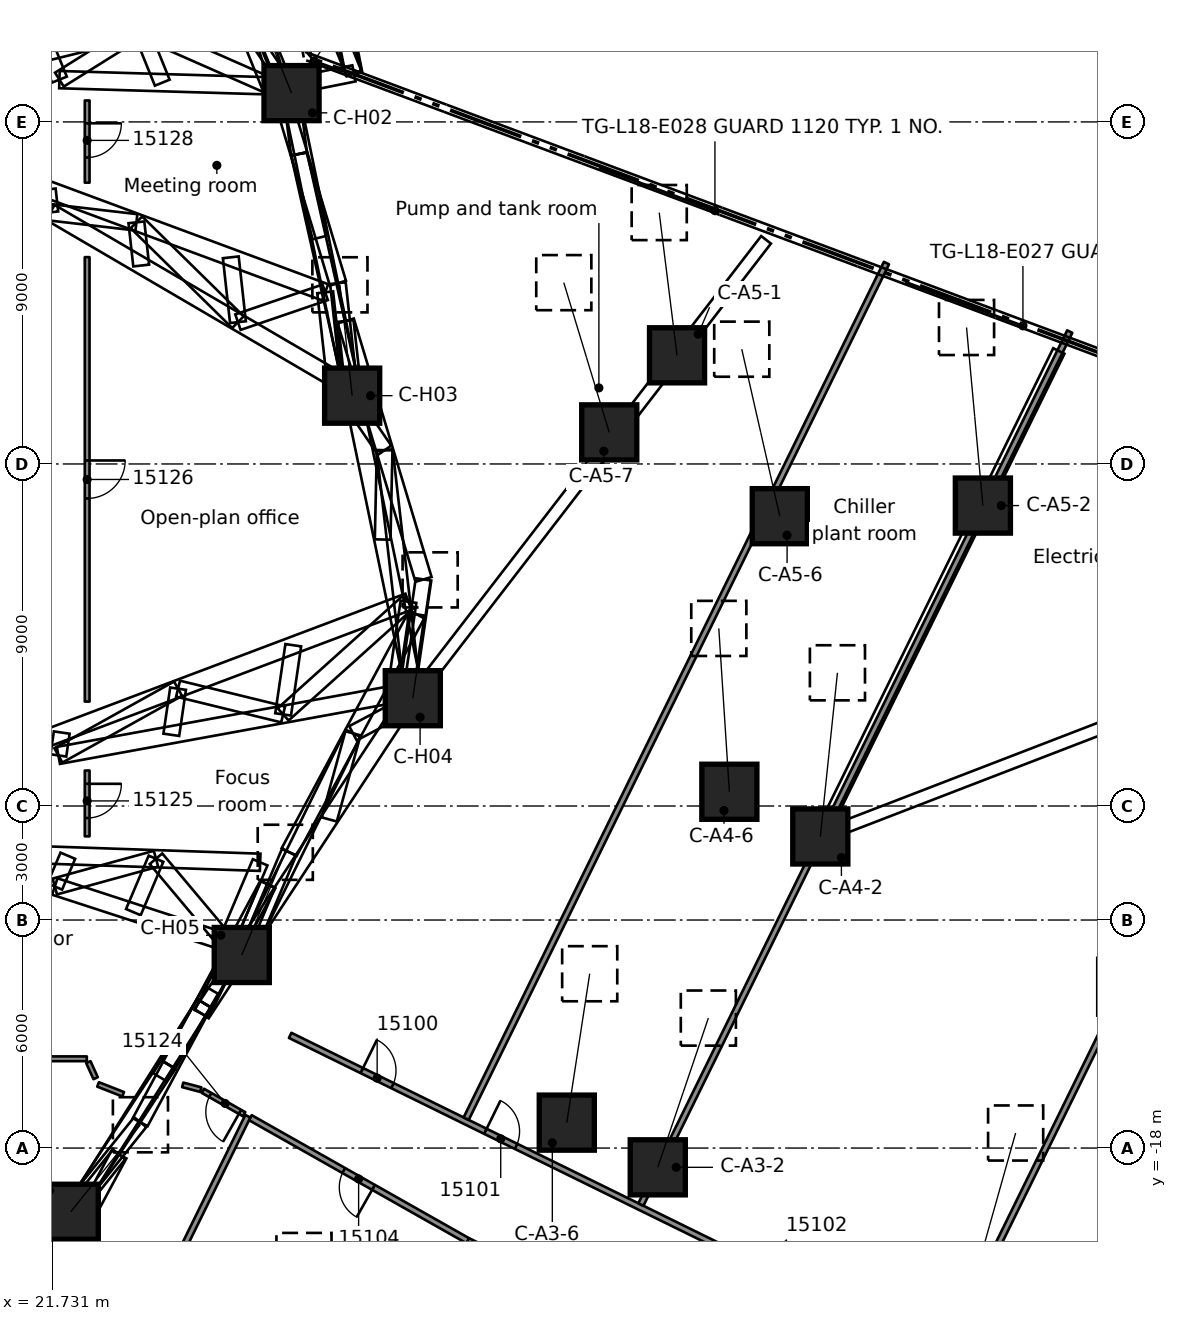
"""IFC4 building model, lengths in metres.
Left out: names, types, materials, properties, quantities, classifications, styles, units other than length and angle.
Written with IfcOpenShell. Run it as: python <this file> out.ifc"""

import sys

from ifc_helpers import new_model, si_unit, direction, frame, frame_2d, origin, origin_2d, place, context, subcontext, project, spatial, rectangle, extrude, element, fill, save


model = new_model("IFC4")
c1 = context("Model", 3, precision=1e-05, world=origin(), true_north=direction((0.0, 1.0)))
c2 = subcontext(c1, "Body", "Model", "MODEL_VIEW")
j1 = project(units=[si_unit("LENGTHUNIT", "METRE"), si_unit("PLANEANGLEUNIT", "RADIAN")], contexts=[c1])
p1 = place(None, origin())
s1 = spatial("IfcSite", under=j1, at=p1, CompositionType="ELEMENT")
p2 = place(p1, origin())
s2 = spatial("IfcBuilding", under=s1, at=p2, CompositionType="ELEMENT")
p3 = place(p2, frame((0.0, 0.0, 76.3)))
s3 = spatial("IfcBuildingStorey", under=s2, at=p3, CompositionType="ELEMENT", Elevation=76.3)
p4 = place(p3, frame((27.046, -24.096, 0.515), z_axis=(0.273638788717, 0.655437821725, 0.703933999152), x_axis=(-0.922806926199, 0.38526273757, 0.0)))
e1 = element("IfcColumn", 1, at=p4, inside=s3, PredefinedType="COLUMN", context=c2, shape_type="SweptSolid", body=[
    extrude(rectangle(XDim=1.45, YDim=1.45, at=origin_2d()), origin(), (0.0, 0.0, 1.0), 4.788),
])
p5 = place(p3, frame((37.666, -18.507, 0.57), z_axis=(0.252347690402, 0.744499743234, 0.618094471318), x_axis=(-0.947075588551, 0.321010637785, 0.0)))
e2 = element("IfcColumn", 2, at=p5, inside=s3, PredefinedType="COLUMN", context=c2, shape_type="SweptSolid", body=[
    extrude(rectangle(XDim=1.45, YDim=1.45, at=origin_2d()), origin(), (0.0, 0.0, 1.0), 5.275),
])
p6 = place(p3, frame((45.713, -22.461, 0.614), z_axis=(0.229855301875, 0.814814927922, 0.532205950207), x_axis=(-0.962438656011, 0.27149923281, 0.0)))
e3 = element("IfcColumn", 3, at=p6, inside=s3, PredefinedType="COLUMN", context=c2, shape_type="SweptSolid", body=[
    extrude(rectangle(XDim=1.45, YDim=1.45, at=origin_2d()), origin(), (0.0, 0.0, 1.0), 5.961),
])
p7 = place(p3, frame((35.272, -17.331, 0.558), z_axis=(0.117156658899, 0.761186259922, 0.637863461081), x_axis=(-0.988361727552, 0.152121975764, 0.0)))
e4 = element("IfcColumn", 4, at=p7, inside=s3, PredefinedType="COLUMN", context=c2, shape_type="SweptSolid", body=[
    extrude(rectangle(XDim=1.45, YDim=1.45, at=origin_2d()), origin(), (0.0, 0.0, 1.0), 5.147),
])
p8 = place(p3, frame((41.943, -9.801, 0.581), z_axis=(0.083399652731, 0.79638314847, 0.599014506299), x_axis=(-0.994561238126, 0.10415346186, 0.0)))
e5 = element("IfcColumn", 5, at=p8, inside=s3, PredefinedType="COLUMN", context=c2, shape_type="SweptSolid", body=[
    extrude(rectangle(XDim=1.45, YDim=1.45, at=origin_2d()), origin(), (0.0, 0.0, 1.0), 5.407),
])
p9 = place(p3, frame((39.55, -8.625, 0.579), z_axis=(-0.051587307713, 0.797361327735, 0.601293325022), x_axis=(-0.997913662281, -0.064562548216, 0.0)))
e6 = element("IfcColumn", 6, at=p9, inside=s3, PredefinedType="COLUMN", context=c2, shape_type="SweptSolid", body=[
    extrude(rectangle(XDim=1.45, YDim=1.45, at=origin_2d()), origin(), (0.0, 0.0, 1.0), 5.39),
])
p10 = place(p3, frame((38.173, 2.859, 0.546), z_axis=(-0.093293000963, 0.747169609484, 0.658053182224), x_axis=(-0.992294736126, -0.123899784732, 0.0)))
e7 = element("IfcColumn", 7, at=p10, inside=s3, PredefinedType="COLUMN", context=c2, shape_type="SweptSolid", body=[
    extrude(rectangle(XDim=1.45, YDim=1.45, at=origin_2d()), origin(), (0.0, 0.0, 1.0), 5.027),
])
p11 = place(p3, frame((46.221, -1.095, 0.599), z_axis=(-0.075541470187, 0.823363417812, 0.562464370863), x_axis=(-0.995817591269, -0.091363695854, 0.0)))
e8 = element("IfcColumn", 8, at=p11, inside=s3, PredefinedType="COLUMN", context=c2, shape_type="SweptSolid", body=[
    extrude(rectangle(XDim=1.45, YDim=1.45, at=origin_2d()), origin(), (0.0, 0.0, 1.0), 5.691),
])
p12 = place(p3, frame((40.877, -1.374, 0.59), z_axis=(-0.180717754786, 0.793306866009, 0.581382240396), x_axis=(-0.975020978292, -0.222112790921, 0.0)))
e9 = element("IfcColumn", 9, at=p12, inside=s3, PredefinedType="COLUMN", context=c2, shape_type="SweptSolid", body=[
    extrude(rectangle(XDim=1.45, YDim=1.45, at=origin_2d()), origin(), (0.0, 0.0, 1.0), 5.539),
])
p13 = place(p3, frame((36.389, 0.831, 0.568), z_axis=(-0.227597691455, 0.749892107941, 0.621177202811), x_axis=(-0.956897644935, -0.290425372716, 0.0)))
e10 = element("IfcColumn", 10, at=p13, inside=s3, PredefinedType="COLUMN", context=c2, shape_type="SweptSolid", body=[
    extrude(rectangle(XDim=1.45, YDim=1.45, at=origin_2d()), origin(), (0.0, 0.0, 1.0), 5.254),
])
p14 = place(p3, frame((28.029, 9.758, 0.469), z_axis=(-0.242399975133, 0.599329365947, 0.762919761947), x_axis=(-0.927046689542, -0.374945909979, 0.0)))
e11 = element("IfcColumn", 11, at=p14, inside=s3, PredefinedType="COLUMN", context=c2, shape_type="SweptSolid", body=[
    extrude(rectangle(XDim=1.45, YDim=1.45, at=origin_2d()), origin(), (0.0, 0.0, 1.0), 4.538),
])
p15 = place(p3, frame((29.624, 1.797, 0.469), z_axis=(-0.070948481985, 0.642678137038, 0.762844102735), x_axis=(-0.993961604032, -0.1097284362, 0.0)))
e12 = element("IfcColumn", 12, at=p15, inside=s3, PredefinedType="COLUMN", context=c2, shape_type="SweptSolid", body=[
    extrude(rectangle(XDim=1.45, YDim=1.45, at=origin_2d()), origin(), (0.0, 0.0, 1.0), 4.539),
])
p16 = place(p3, frame((31.22, -6.163, 0.491), z_axis=(0.098169402539, 0.670106023434, 0.735744986909), x_axis=(-0.989438817347, 0.144951118407, 0.0)))
e13 = element("IfcColumn", 13, at=p16, inside=s3, PredefinedType="COLUMN", context=c2, shape_type="SweptSolid", body=[
    extrude(rectangle(XDim=1.45, YDim=1.45, at=origin_2d()), origin(), (0.0, 0.0, 1.0), 4.646),
])
p17 = place(p3, frame((26.719, -12.92, 0.469), z_axis=(0.252280476656, 0.595306617304, 0.762866038366), x_axis=(-0.920733990351, 0.390190875101, 0.0)))
e14 = element("IfcColumn", 14, at=p17, inside=s3, PredefinedType="COLUMN", context=c2, shape_type="SweptSolid", body=[
    extrude(rectangle(XDim=1.45, YDim=1.45, at=origin_2d()), origin(), (0.0, 0.0, 1.0), 4.539),
])
p18 = place(p3, frame((22.219, -19.677, 0.469), z_axis=(0.404114198636, 0.504604790097, 0.762932316967), x_axis=(-0.780543967772, 0.625100883358, 0.0)))
e15 = element("IfcColumn", 15, at=p18, inside=s3, PredefinedType="COLUMN", context=c2, shape_type="SweptSolid", body=[
    extrude(rectangle(XDim=1.45, YDim=1.45, at=origin_2d()), origin(), (0.0, 0.0, 1.0), 4.538),
])
p19 = place(p3, frame((22.682, -15.739, 0.0), z_axis=(0.0, 0.0, 1.0), x_axis=(0.413486242538, -0.910510366351, 0.0)))
e16 = element("IfcWall", 16, at=p19, inside=s3, PredefinedType="PARTITIONING", context=c2, shape_type="SweptSolid", body=[
    extrude(rectangle(XDim=0.465, YDim=0.125, at=frame_2d((0.232, 0.0))), origin(), (0.0, 0.0, 1.0), 3.98),
])
p20 = place(p3, frame((26.782, -17.11, 0.0), z_axis=(0.0, 0.0, 1.0), x_axis=(-0.869921591707, 0.493190048847, 0.0)))
e17 = element("IfcWall", 17, at=p20, inside=s3, PredefinedType="PARTITIONING", context=c2, shape_type="SweptSolid", body=[
    extrude(rectangle(XDim=1.25, YDim=0.125, at=frame_2d((0.625, 0.0))), origin(), (0.0, 0.0, 1.0), 3.98),
])
p21 = place(p20, frame((0.125, 0.0, 0.0)))
e18 = element("IfcOpeningElement", 18, at=p21, cuts=e17, PredefinedType="OPENING", context=c2, shape_type="SweptSolid", body=[
    extrude(rectangle(XDim=0.9, YDim=2.1, at=frame_2d((0.45, 1.05))), frame((0.0, 0.073, 0.0), z_axis=(0.0, -1.0, 0.0), x_axis=(1.0, 0.0, 0.0)), (0.0, 0.0, 1.0), 0.145),
])
p22 = place(p3, frame((32.666, -20.438, 0.0), z_axis=(0.0, 0.0, 1.0), x_axis=(-0.870308211119, 0.4925074798, 0.0)))
e19 = element("IfcWall", 19, at=p22, inside=s3, PredefinedType="PARTITIONING", context=c2, shape_type="SweptSolid", body=[
    extrude(rectangle(XDim=6.575, YDim=0.15, at=frame_2d((3.287, 0.0))), origin(), (0.0, 0.0, 1.0), 3.98),
])
p23 = place(p22, frame((2.85, 0.0, 0.0)))
e20 = element("IfcOpeningElement", 20, at=p23, cuts=e19, PredefinedType="OPENING", context=c2, shape_type="SweptSolid", body=[
    extrude(rectangle(XDim=0.9, YDim=2.1, at=frame_2d((0.45, 1.05))), frame((0.0, 0.085, 0.0), z_axis=(0.0, -1.0, 0.0), x_axis=(1.0, 0.0, 0.0)), (0.0, 0.0, 1.0), 0.17),
])
p24 = place(p3, frame((43.321, -25.673, 0.0), z_axis=(0.0, 0.0, 1.0), x_axis=(-0.897519057595, 0.440975669684, 0.0)))
e21 = element("IfcWall", 21, at=p24, inside=s3, PredefinedType="PARTITIONING", context=c2, shape_type="SweptSolid", body=[
    extrude(rectangle(XDim=11.872, YDim=0.15, at=frame_2d((5.936, 0.0))), origin(), (0.0, 0.0, 1.0), 3.98),
])
p25 = place(p24, frame((3.525, 0.0, 0.0)))
e22 = element("IfcOpeningElement", 22, at=p25, cuts=e21, PredefinedType="OPENING", context=c2, shape_type="SweptSolid", body=[
    extrude(rectangle(XDim=0.9, YDim=2.1, at=frame_2d((0.45, 1.05))), frame((0.0, 0.085, 0.0), z_axis=(0.0, -1.0, 0.0), x_axis=(1.0, 0.0, 0.0)), (0.0, 0.0, 1.0), 0.17),
])
p26 = place(p3, frame((27.993, -15.035, 0.0), z_axis=(0.0, 0.0, 1.0), x_axis=(0.897531550108, -0.440950242728, 0.0)))
e23 = element("IfcWall", 23, at=p26, inside=s3, PredefinedType="PARTITIONING", context=c2, shape_type="SweptSolid", body=[
    extrude(rectangle(XDim=18.68, YDim=0.15, at=frame_2d((9.34, 0.0))), origin(), (0.0, 0.0, 1.0), 3.98),
])
p27 = place(p26, frame((2.1, 0.0, 0.0)))
e24 = element("IfcOpeningElement", 24, at=p27, cuts=e23, PredefinedType="OPENING", context=c2, shape_type="SweptSolid", body=[
    extrude(rectangle(XDim=0.9, YDim=2.1, at=frame_2d((0.45, 1.05))), frame((0.0, 0.085, 0.0), z_axis=(0.0, -1.0, 0.0), x_axis=(1.0, 0.0, 0.0)), (0.0, 0.0, 1.0), 0.17),
])
p28 = place(p26, frame((5.723, 0.0, 0.0)))
e25 = element("IfcOpeningElement", 25, at=p28, cuts=e23, PredefinedType="OPENING", context=c2, shape_type="SweptSolid", body=[
    extrude(rectangle(XDim=0.9, YDim=2.1, at=frame_2d((0.45, 1.05))), frame((0.0, 0.085, 0.0), z_axis=(0.0, -1.0, 0.0), x_axis=(1.0, 0.0, 0.0)), (0.0, 0.0, 1.0), 0.17),
])
p29 = place(p26, frame((14.096, 0.0, 0.0)))
e26 = element("IfcOpeningElement", 26, at=p29, cuts=e23, PredefinedType="OPENING", context=c2, shape_type="SweptSolid", body=[
    extrude(rectangle(XDim=0.9, YDim=2.1, at=frame_2d((0.45, 1.05))), frame((0.0, 0.085, 0.0), z_axis=(0.0, -1.0, 0.0), x_axis=(1.0, 0.0, 0.0)), (0.0, 0.0, 1.0), 0.17),
])
p30 = place(p3, frame((22.938, -16.326, 0.0), z_axis=(0.0, 0.0, 1.0), x_axis=(0.931085434085, -0.36480119851, 0.0)))
e27 = element("IfcWall", 27, at=p30, inside=s3, PredefinedType="PARTITIONING", context=c2, shape_type="SweptSolid", body=[
    extrude(rectangle(XDim=0.71, YDim=0.125, at=frame_2d((0.355, 0.0))), origin(), (0.0, 0.0, 1.0), 3.98),
])
p31 = place(p3, frame((25.165, -16.337, 0.0), z_axis=(0.0, 0.0, 1.0), x_axis=(0.966726866197, -0.255810801517, 0.0)))
e28 = element("IfcWall", 28, at=p31, inside=s3, PredefinedType="PARTITIONING", context=c2, shape_type="SweptSolid", body=[
    extrude(rectangle(XDim=0.492, YDim=0.125, at=frame_2d((0.246, 0.0))), origin(), (0.0, 0.0, 1.0), 3.98),
])
p32 = place(p3, frame((22.642, -15.651, 0.0), z_axis=(0.0, 0.0, 1.0), x_axis=(-1.0, 0.0, 0.0)))
e29 = element("IfcWall", 29, at=p32, inside=s3, PredefinedType="PARTITIONING", context=c2, shape_type="SweptSolid", body=[
    extrude(rectangle(XDim=10.482, YDim=0.125, at=frame_2d((5.241, 0.0))), origin(), (0.0, 0.0, 1.0), 3.98),
])
p33 = place(p32, frame((4.35, 0.0, 0.0)))
e30 = element("IfcOpeningElement", 30, at=p33, cuts=e29, PredefinedType="OPENING", context=c2, shape_type="SweptSolid", body=[
    extrude(rectangle(XDim=1.8, YDim=2.1, at=frame_2d((0.9, 1.05))), frame((0.0, 0.073, 0.0), z_axis=(0.0, -1.0, 0.0), x_axis=(1.0, 0.0, 0.0)), (0.0, 0.0, 1.0), 0.145),
])
p34 = place(p3, frame((48.092, -21.677, 0.0), z_axis=(0.0, 0.0, 1.0), x_axis=(0.808032420816, 0.589138020255, 0.0)))
e31 = element("IfcWall", 31, at=p34, inside=s3, PredefinedType="PARTITIONING", context=c2, shape_type="SweptSolid", body=[
    extrude(rectangle(XDim=2.237, YDim=0.15, at=frame_2d((1.119, 0.0))), origin(), (0.0, 0.0, 1.0), 3.98),
])
p35 = place(p3, frame((45.314, -23.198, 0.0), z_axis=(0.0, 0.0, 1.0), x_axis=(0.441005817264, 0.897504244636, 0.0)))
e32 = element("IfcWall", 32, at=p35, inside=s3, PredefinedType="PARTITIONING", context=c2, shape_type="SweptSolid", body=[
    extrude(rectangle(XDim=25.623, YDim=0.15, at=frame_2d((12.812, 0.0))), origin(), (0.0, 0.0, 1.0), 3.98),
])
p36 = place(p3, frame((37.222, -19.486, 0.0), z_axis=(0.0, 0.0, 1.0), x_axis=(0.440971293859, 0.897521207545, 0.0)))
e33 = element("IfcWall", 33, at=p36, inside=s3, PredefinedType="PARTITIONING", context=c2, shape_type="SweptSolid", body=[
    extrude(rectangle(XDim=25.592, YDim=0.15, at=frame_2d((12.796, 0.0))), origin(), (0.0, 0.0, 1.0), 3.98),
])
p37 = place(p3, frame((32.624, -17.227, 0.0), z_axis=(0.0, 0.0, 1.0), x_axis=(0.440938270509, 0.897537431866, 0.0)))
e34 = element("IfcWall", 34, at=p37, inside=s3, PredefinedType="PARTITIONING", context=c2, shape_type="SweptSolid", body=[
    extrude(rectangle(XDim=25.083, YDim=0.15, at=frame_2d((12.542, 0.0))), origin(), (0.0, 0.0, 1.0), 3.98),
])
p38 = place(p3, frame((19.515, -32.15, 0.0), z_axis=(0.0, 0.0, 1.0), x_axis=(0.44100368403, 0.897505292838, 0.0)))
e35 = element("IfcWall", 35, at=p38, inside=s3, PredefinedType="PARTITIONING", context=c2, shape_type="SweptSolid", body=[
    extrude(rectangle(XDim=16.698, YDim=0.15, at=frame_2d((8.349, 0.0))), origin(), (0.0, 0.0, 1.0), 3.98),
])
p39 = place(p3, frame((22.651, -8.066, 0.0), z_axis=(0.0, 0.0, 1.0), x_axis=(0.0, -1.0, 0.0)))
e36 = element("IfcWall", 36, at=p39, inside=s3, PredefinedType="PARTITIONING", context=c2, shape_type="SweptSolid", body=[
    extrude(rectangle(XDim=1.732, YDim=0.125, at=frame_2d((0.866, 0.0))), origin(), (0.0, 0.0, 1.0), 3.98),
])
p40 = place(p39, frame((0.35, 0.0, 0.0)))
e37 = element("IfcOpeningElement", 37, at=p40, cuts=e36, PredefinedType="OPENING", context=c2, shape_type="SweptSolid", body=[
    extrude(rectangle(XDim=0.9, YDim=2.1, at=frame_2d((0.45, 1.05))), frame((0.0, 0.073, 0.0), z_axis=(0.0, -1.0, 0.0), x_axis=(1.0, 0.0, 0.0)), (0.0, 0.0, 1.0), 0.145),
])
p41 = place(p3, frame((22.651, 5.442, 0.0), z_axis=(0.0, 0.0, 1.0), x_axis=(0.0, -1.0, 0.0)))
e38 = element("IfcWall", 38, at=p41, inside=s3, PredefinedType="PARTITIONING", context=c2, shape_type="SweptSolid", body=[
    extrude(rectangle(XDim=11.694, YDim=0.125, at=frame_2d((5.847, 0.0))), origin(), (0.0, 0.0, 1.0), 3.98),
])
p42 = place(p41, frame((5.35, 0.0, 0.0)))
e39 = element("IfcOpeningElement", 39, at=p42, cuts=e38, PredefinedType="OPENING", context=c2, shape_type="SweptSolid", body=[
    extrude(rectangle(XDim=1.0, YDim=2.1, at=frame_2d((0.5, 1.05))), frame((0.0, 0.073, 0.0), z_axis=(0.0, -1.0, 0.0), x_axis=(1.0, 0.0, 0.0)), (0.0, 0.0, 1.0), 0.145),
])
p43 = place(p3, frame((22.651, 9.564, 0.0), z_axis=(0.0, 0.0, 1.0), x_axis=(0.0, -1.0, 0.0)))
e40 = element("IfcWall", 40, at=p43, inside=s3, PredefinedType="PARTITIONING", context=c2, shape_type="SweptSolid", body=[
    extrude(rectangle(XDim=2.163, YDim=0.125, at=frame_2d((1.082, 0.0))), origin(), (0.0, 0.0, 1.0), 3.98),
])
p44 = place(p43, frame((0.6, 0.0, 0.0)))
e41 = element("IfcOpeningElement", 41, at=p44, cuts=e40, PredefinedType="OPENING", context=c2, shape_type="SweptSolid", body=[
    extrude(rectangle(XDim=0.9, YDim=2.1, at=frame_2d((0.45, 1.05))), frame((0.0, 0.073, 0.0), z_axis=(0.0, -1.0, 0.0), x_axis=(1.0, 0.0, 0.0)), (0.0, 0.0, 1.0), 0.145),
])
p45 = place(p27, origin())
e42 = element("IfcDoor", 42, at=p45, inside=s3, OperationType="SINGLE_SWING_LEFT", PredefinedType="DOOR", context=c2, shape_type="SweptSolid", body=[
    extrude(rectangle(XDim=0.9, YDim=2.1, at=frame_2d((0.45, 1.05))), frame((0.0, 0.025, 0.0), z_axis=(0.0, -1.0, 0.0), x_axis=(1.0, 0.0, 0.0)), (0.0, 0.0, 1.0), 0.05),
])
fill(e24, e42)
p46 = place(p28, origin())
e43 = element("IfcDoor", 43, at=p46, inside=s3, OperationType="SINGLE_SWING_LEFT", PredefinedType="DOOR", context=c2, shape_type="SweptSolid", body=[
    extrude(rectangle(XDim=0.9, YDim=2.1, at=frame_2d((0.45, 1.05))), frame((0.0, 0.025, 0.0), z_axis=(0.0, -1.0, 0.0), x_axis=(1.0, 0.0, 0.0)), (0.0, 0.0, 1.0), 0.05),
])
fill(e25, e43)
p47 = place(p23, origin())
e44 = element("IfcDoor", 44, at=p47, inside=s3, OperationType="SINGLE_SWING_RIGHT", PredefinedType="DOOR", context=c2, shape_type="SweptSolid", body=[
    extrude(rectangle(XDim=0.9, YDim=2.1, at=frame_2d((0.45, 1.05))), frame((0.0, 0.025, 0.0), z_axis=(0.0, -1.0, 0.0), x_axis=(1.0, 0.0, 0.0)), (0.0, 0.0, 1.0), 0.05),
])
fill(e20, e44)
p48 = place(p21, origin())
e45 = element("IfcDoor", 45, at=p48, inside=s3, OperationType="SINGLE_SWING_LEFT", PredefinedType="DOOR", context=c2, shape_type="SweptSolid", body=[
    extrude(rectangle(XDim=0.9, YDim=2.1, at=frame_2d((0.45, 1.05))), frame((0.0, 0.025, 0.0), z_axis=(0.0, -1.0, 0.0), x_axis=(1.0, 0.0, 0.0)), (0.0, 0.0, 1.0), 0.05),
])
fill(e18, e45)
p49 = place(p40, origin())
e46 = element("IfcDoor", 46, at=p49, inside=s3, OperationType="SINGLE_SWING_LEFT", PredefinedType="DOOR", context=c2, shape_type="SweptSolid", body=[
    extrude(rectangle(XDim=0.9, YDim=2.1, at=frame_2d((0.45, 1.05))), frame((0.0, 0.025, 0.0), z_axis=(0.0, -1.0, 0.0), x_axis=(1.0, 0.0, 0.0)), (0.0, 0.0, 1.0), 0.05),
])
fill(e37, e46)
p50 = place(p42, origin())
e47 = element("IfcDoor", 47, at=p50, inside=s3, OperationType="SINGLE_SWING_RIGHT", PredefinedType="DOOR", context=c2, shape_type="SweptSolid", body=[
    extrude(rectangle(XDim=1.0, YDim=2.1, at=frame_2d((0.5, 1.05))), frame((0.0, 0.025, 0.0), z_axis=(0.0, -1.0, 0.0), x_axis=(1.0, 0.0, 0.0)), (0.0, 0.0, 1.0), 0.05),
])
fill(e39, e47)
p51 = place(p44, origin())
e48 = element("IfcDoor", 48, at=p51, inside=s3, OperationType="SINGLE_SWING_LEFT", PredefinedType="DOOR", context=c2, shape_type="SweptSolid", body=[
    extrude(rectangle(XDim=0.9, YDim=2.1, at=frame_2d((0.45, 1.05))), frame((0.0, 0.025, 0.0), z_axis=(0.0, -1.0, 0.0), x_axis=(1.0, 0.0, 0.0)), (0.0, 0.0, 1.0), 0.05),
])
fill(e41, e48)
save(model, sys.argv[1])
